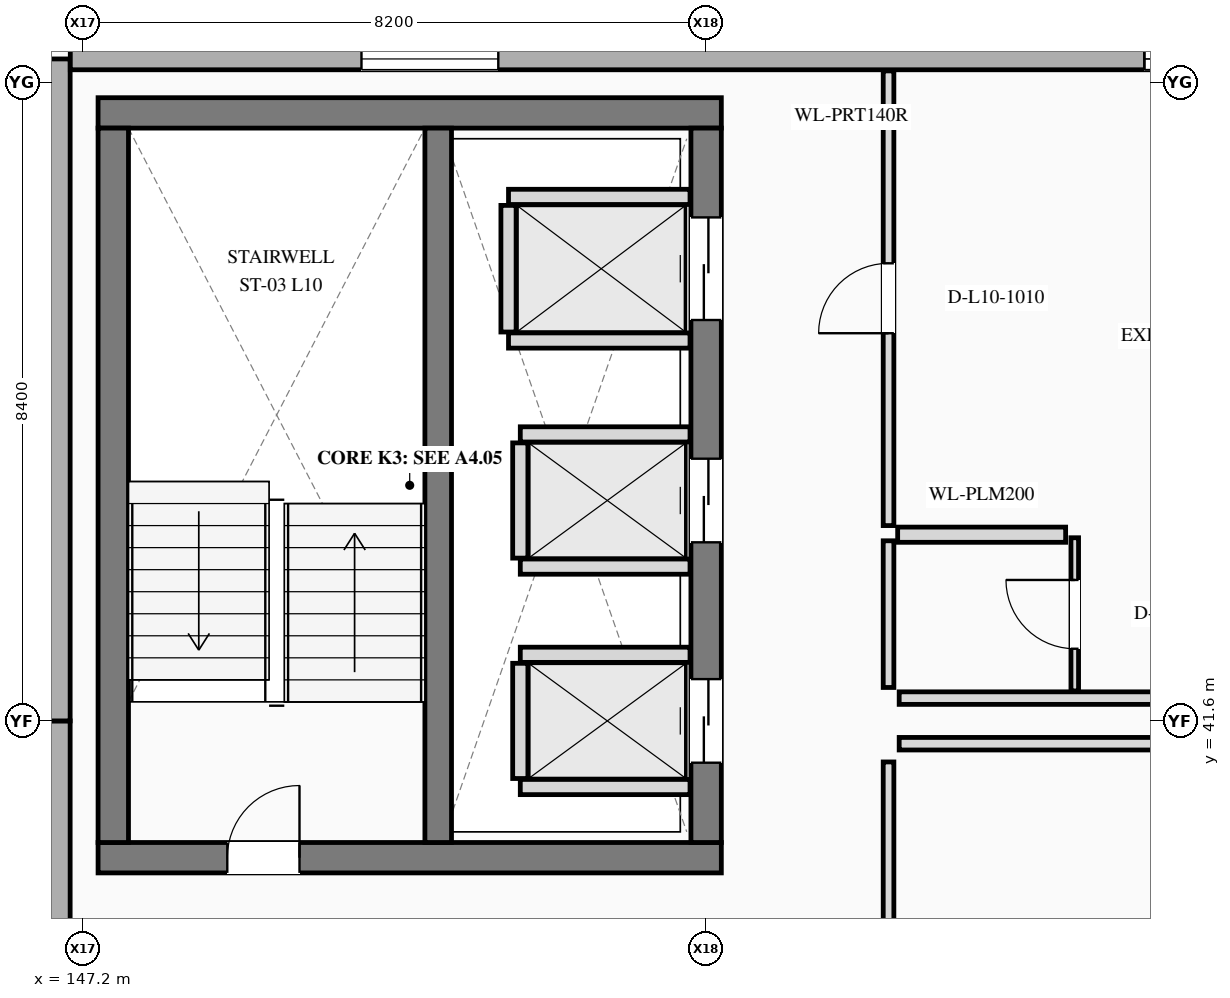
"""IFC4 building model, lengths in metres.
Left out: names, types, materials, properties, quantities, classifications, styles, units other than length and angle.
Written with IfcOpenShell. Run it as: python <this file> out.ifc"""

import sys

from ifc_helpers import new_model, si_unit, direction, frame, frame_2d, origin, place, context, subcontext, project, spatial, rectangle, extrude, element, fill, save


model = new_model("IFC4")
c1 = context("Model", 3, precision=1e-05, world=origin(), true_north=direction((0.0, 1.0)))
c2 = subcontext(c1, "Body", "Model", "MODEL_VIEW")
j1 = project(units=[si_unit("LENGTHUNIT", "METRE"), si_unit("PLANEANGLEUNIT", "RADIAN")], contexts=[c1])
p1 = place(None, origin())
s1 = spatial("IfcSite", under=j1, at=p1, CompositionType="ELEMENT")
p2 = place(p1, origin())
s2 = spatial("IfcBuilding", under=s1, at=p2, CompositionType="ELEMENT")
p3 = place(p2, frame((0.0, 0.0, 41.1)))
s3 = spatial("IfcBuildingStorey", under=s2, at=p3, CompositionType="ELEMENT", Elevation=41.1)
p4 = place(p3, frame((146.89, 33.2, 0.0), z_axis=(0.0, 0.0, 1.0), x_axis=(0.0, 1.0, 0.0)))
e1 = element("IfcWall", 1, at=p4, inside=s3, PredefinedType="STANDARD", context=c2, shape_type="SweptSolid", body=[
    extrude(rectangle(XDim=8.4, YDim=0.285, at=frame_2d((4.2, 0.0))), origin(), (0.0, 0.0, 1.0), 3.5),
])
p5 = place(p3, frame((146.89, 41.6, 0.0), z_axis=(0.0, 0.0, 1.0), x_axis=(0.0, 1.0, 0.0)))
e2 = element("IfcWall", 2, at=p5, inside=s3, PredefinedType="STANDARD", context=c2, shape_type="SweptSolid", body=[
    extrude(rectangle(XDim=8.71, YDim=0.285, at=frame_2d((4.355, 0.0))), origin(), (0.0, 0.0, 1.0), 3.5),
])
p6 = place(p3, frame((166.166, 50.31, 0.0), z_axis=(0.0, 0.0, 1.0), x_axis=(-1.0, 0.0, 0.0)))
e3 = element("IfcWall", 3, at=p6, inside=s3, PredefinedType="STANDARD", context=c2, shape_type="SweptSolid", body=[
    extrude(rectangle(XDim=19.131, YDim=0.285, at=frame_2d((9.565, 0.0))), origin(), (0.0, 0.0, 1.0), 3.5),
])
p7 = place(p6, frame((3.2, 0.0, 0.88)))
e4 = element("IfcOpeningElement", 4, at=p7, cuts=e3, PredefinedType="OPENING", context=c2, shape_type="SweptSolid", body=[
    extrude(rectangle(XDim=1.8, YDim=1.8, at=frame_2d((0.9, 0.9))), frame((0.0, 0.152, 0.0), z_axis=(0.0, -1.0, 0.0), x_axis=(1.0, 0.0, 0.0)), (0.0, 0.0, 1.0), 0.305),
])
p8 = place(p6, frame((13.5, 0.0, 0.88)))
e5 = element("IfcOpeningElement", 5, at=p8, cuts=e3, PredefinedType="OPENING", context=c2, shape_type="SweptSolid", body=[
    extrude(rectangle(XDim=1.8, YDim=1.8, at=frame_2d((0.9, 0.9))), frame((0.0, 0.152, 0.0), z_axis=(0.0, -1.0, 0.0), x_axis=(1.0, 0.0, 0.0)), (0.0, 0.0, 1.0), 0.305),
])
p9 = place(p3, frame((147.4, 39.8, 0.0), z_axis=(0.0, 0.0, 1.0), x_axis=(1.0, 0.0, 0.0)))
e6 = element("IfcWall", 6, at=p9, inside=s3, PredefinedType="SHEAR", context=c2, shape_type="SweptSolid", body=[
    extrude(rectangle(XDim=8.2, YDim=0.4, at=frame_2d((4.1, 0.0))), origin(), (0.0, 0.0, 1.0), 3.5),
])
p10 = place(p9, frame((1.7, 0.0, 0.0)))
e7 = element("IfcOpeningElement", 7, at=p10, cuts=e6, PredefinedType="OPENING", context=c2, shape_type="SweptSolid", body=[
    extrude(rectangle(XDim=0.95, YDim=2.2, at=frame_2d((0.475, 1.1))), frame((0.0, 0.21, 0.0), z_axis=(0.0, -1.0, 0.0), x_axis=(1.0, 0.0, 0.0)), (0.0, 0.0, 1.0), 0.42),
])
p11 = place(p3, frame((155.6, 49.6, 0.0), z_axis=(0.0, 0.0, 1.0), x_axis=(-1.0, 0.0, 0.0)))
e8 = element("IfcWall", 8, at=p11, inside=s3, PredefinedType="SHEAR", context=c2, shape_type="SweptSolid", body=[
    extrude(rectangle(XDim=8.2, YDim=0.4, at=frame_2d((4.1, 0.0))), origin(), (0.0, 0.0, 1.0), 3.5),
])
p12 = place(p3, frame((147.6, 49.4, 0.0), z_axis=(0.0, 0.0, 1.0), x_axis=(0.0, -1.0, 0.0)))
e9 = element("IfcWall", 9, at=p12, inside=s3, PredefinedType="SHEAR", context=c2, shape_type="SweptSolid", body=[
    extrude(rectangle(XDim=9.4, YDim=0.4, at=frame_2d((4.7, 0.0))), origin(), (0.0, 0.0, 1.0), 3.5),
])
p13 = place(p3, frame((155.4, 40.0, 0.0), z_axis=(0.0, 0.0, 1.0), x_axis=(0.0, 1.0, 0.0)))
e10 = element("IfcWall", 10, at=p13, inside=s3, PredefinedType="SHEAR", context=c2, shape_type="SweptSolid", body=[
    extrude(rectangle(XDim=9.4, YDim=0.4, at=frame_2d((4.7, 0.0))), origin(), (0.0, 0.0, 1.0), 3.5),
])
p14 = place(p13, frame((1.05, 0.0, 0.0)))
e11 = element("IfcOpeningElement", 11, at=p14, cuts=e10, PredefinedType="OPENING", context=c2, shape_type="SweptSolid", body=[
    extrude(rectangle(XDim=1.1, YDim=2.2, at=frame_2d((0.55, 1.1))), frame((0.0, 0.21, 0.0), z_axis=(0.0, -1.0, 0.0), x_axis=(1.0, 0.0, 0.0)), (0.0, 0.0, 1.0), 0.42),
])
p15 = place(p13, frame((3.95, 0.0, 0.0)))
e12 = element("IfcOpeningElement", 12, at=p15, cuts=e10, PredefinedType="OPENING", context=c2, shape_type="SweptSolid", body=[
    extrude(rectangle(XDim=1.1, YDim=2.2, at=frame_2d((0.55, 1.1))), frame((0.0, 0.21, 0.0), z_axis=(0.0, -1.0, 0.0), x_axis=(1.0, 0.0, 0.0)), (0.0, 0.0, 1.0), 0.42),
])
p16 = place(p13, frame((6.875, 0.0, 0.0)))
e13 = element("IfcOpeningElement", 13, at=p16, cuts=e10, PredefinedType="OPENING", context=c2, shape_type="SweptSolid", body=[
    extrude(rectangle(XDim=1.35, YDim=2.3, at=frame_2d((0.675, 1.15))), frame((0.0, 0.21, 0.0), z_axis=(0.0, -1.0, 0.0), x_axis=(1.0, 0.0, 0.0)), (0.0, 0.0, 1.0), 0.42),
])
p17 = place(p3, frame((151.875, 40.0, 0.0), z_axis=(0.0, 0.0, 1.0), x_axis=(0.0, 1.0, 0.0)))
e14 = element("IfcWall", 14, at=p17, inside=s3, PredefinedType="SHEAR", context=c2, shape_type="SweptSolid", body=[
    extrude(rectangle(XDim=9.4, YDim=0.35, at=frame_2d((4.7, 0.0))), origin(), (0.0, 0.0, 1.0), 3.5),
])
for number, where, z_axis, x_axis in (
    (15, (152.955, 40.73, 0.0), (0.0, 0.0, 1.0), (1.0, 0.0, 0.0)),
    (16, (152.955, 42.47, 0.0), (0.0, 0.0, 1.0), (1.0, 0.0, 0.0)),
):
    element("IfcWall", number, at=place(p3, frame(where, z_axis=z_axis, x_axis=x_axis)), inside=s3, PredefinedType="PLUMBINGWALL", context=c2, shape_type="SweptSolid", body=[
        extrude(rectangle(XDim=2.233, YDim=0.2, at=frame_2d((1.116, 0.0))), origin(), (0.0, 0.0, 1.0), 3.18),
    ])
p18 = place(p3, frame((152.955, 40.842, 0.0), z_axis=(0.0, 0.0, 1.0), x_axis=(0.0, 1.0, 0.0)))
e17 = element("IfcWall", 17, at=p18, inside=s3, PredefinedType="PLUMBINGWALL", context=c2, shape_type="SweptSolid", body=[
    extrude(rectangle(XDim=1.516, YDim=0.2, at=frame_2d((0.758, 0.0))), origin(), (0.0, 0.0, 1.0), 3.18),
])
for number, where, z_axis, x_axis in (
    (18, (152.955, 43.63, 0.0), (0.0, 0.0, 1.0), (1.0, 0.0, 0.0)),
    (19, (152.955, 45.37, 0.0), (0.0, 0.0, 1.0), (1.0, 0.0, 0.0)),
):
    element("IfcWall", number, at=place(p3, frame(where, z_axis=z_axis, x_axis=x_axis)), inside=s3, PredefinedType="PLUMBINGWALL", context=c2, shape_type="SweptSolid", body=[
        extrude(rectangle(XDim=2.233, YDim=0.2, at=frame_2d((1.116, 0.0))), origin(), (0.0, 0.0, 1.0), 3.18),
    ])
p19 = place(p3, frame((152.955, 43.742, 0.0), z_axis=(0.0, 0.0, 1.0), x_axis=(0.0, 1.0, 0.0)))
e20 = element("IfcWall", 20, at=p19, inside=s3, PredefinedType="PLUMBINGWALL", context=c2, shape_type="SweptSolid", body=[
    extrude(rectangle(XDim=1.516, YDim=0.2, at=frame_2d((0.758, 0.0))), origin(), (0.0, 0.0, 1.0), 3.18),
])
for number, where, z_axis, x_axis in (
    (21, (152.8, 46.605, 0.0), (0.0, 0.0, 1.0), (1.0, 0.0, 0.0)),
    (22, (152.8, 48.495, 0.0), (0.0, 0.0, 1.0), (1.0, 0.0, 0.0)),
):
    element("IfcWall", number, at=place(p3, frame(where, z_axis=z_axis, x_axis=x_axis)), inside=s3, PredefinedType="PLUMBINGWALL", context=c2, shape_type="SweptSolid", body=[
        extrude(rectangle(XDim=2.388, YDim=0.2, at=frame_2d((1.194, 0.0))), origin(), (0.0, 0.0, 1.0), 3.18),
    ])
p20 = place(p3, frame((152.8, 46.717, 0.0), z_axis=(0.0, 0.0, 1.0), x_axis=(0.0, 1.0, 0.0)))
e23 = element("IfcWall", 23, at=p20, inside=s3, PredefinedType="PLUMBINGWALL", context=c2, shape_type="SweptSolid", body=[
    extrude(rectangle(XDim=1.666, YDim=0.2, at=frame_2d((0.833, 0.0))), origin(), (0.0, 0.0, 1.0), 3.18),
])
p21 = place(p3, frame((157.8, 35.77, 0.0), z_axis=(0.0, 0.0, 1.0), x_axis=(0.0, 1.0, 0.0)))
e24 = element("IfcWall", 24, at=p21, inside=s3, PredefinedType="PARTITIONING", context=c2, shape_type="SweptSolid", body=[
    extrude(rectangle(XDim=5.29, YDim=0.14, at=frame_2d((2.645, 0.0))), origin(), (0.0, 0.0, 1.0), 3.18),
])
p22 = place(p21, frame((2.125, 0.0, 0.0)))
e25 = element("IfcOpeningElement", 25, at=p22, cuts=e24, PredefinedType="OPENING", context=c2, shape_type="SweptSolid", body=[
    extrude(rectangle(XDim=1.04, YDim=2.4, at=frame_2d((0.52, 1.2))), frame((0.0, 0.08, 0.0), z_axis=(0.0, -1.0, 0.0), x_axis=(1.0, 0.0, 0.0)), (0.0, 0.0, 1.0), 0.16),
])
p23 = place(p3, frame((157.94, 41.3, 0.0), z_axis=(0.0, 0.0, 1.0), x_axis=(1.0, 0.0, 0.0)))
e26 = element("IfcWall", 26, at=p23, inside=s3, PredefinedType="PARTITIONING", context=c2, shape_type="SweptSolid", body=[
    extrude(rectangle(XDim=8.213, YDim=0.165, at=frame_2d((4.106, 0.0))), origin(), (0.0, 0.0, 1.0), 2.57),
])
p24 = place(p3, frame((157.8, 42.04, 0.0), z_axis=(0.0, 0.0, 1.0), x_axis=(0.0, 1.0, 0.0)))
e27 = element("IfcWall", 27, at=p24, inside=s3, PredefinedType="PARTITIONING", context=c2, shape_type="SweptSolid", body=[
    extrude(rectangle(XDim=1.93, YDim=0.14, at=frame_2d((0.965, 0.0))), origin(), (0.0, 0.0, 1.0), 3.18),
])
p25 = place(p3, frame((157.8, 44.17, 0.0), z_axis=(0.0, 0.0, 1.0), x_axis=(0.0, 1.0, 0.0)))
e28 = element("IfcWall", 28, at=p25, inside=s3, PredefinedType="PARTITIONING", context=c2, shape_type="SweptSolid", body=[
    extrude(rectangle(XDim=5.983, YDim=0.14, at=frame_2d((2.991, 0.0))), origin(), (0.0, 0.0, 1.0), 3.18),
])
p26 = place(p25, frame((2.531, 0.0, 0.0)))
e29 = element("IfcOpeningElement", 29, at=p26, cuts=e28, PredefinedType="OPENING", context=c2, shape_type="SweptSolid", body=[
    extrude(rectangle(XDim=0.92, YDim=2.15, at=frame_2d((0.46, 1.075))), frame((0.0, 0.08, 0.0), z_axis=(0.0, -1.0, 0.0), x_axis=(1.0, 0.0, 0.0)), (0.0, 0.0, 1.0), 0.16),
])
p27 = place(p3, frame((157.94, 41.9, 0.0), z_axis=(0.0, 0.0, 1.0), x_axis=(1.0, 0.0, 0.0)))
e30 = element("IfcWall", 30, at=p27, inside=s3, PredefinedType="PARTITIONING", context=c2, shape_type="SweptSolid", body=[
    extrude(rectangle(XDim=8.213, YDim=0.165, at=frame_2d((4.106, 0.0))), origin(), (0.0, 0.0, 1.0), 2.57),
])
p28 = place(p3, frame((157.92, 44.05, 0.0), z_axis=(0.0, 0.0, 1.0), x_axis=(1.0, 0.0, 0.0)))
e31 = element("IfcWall", 31, at=p28, inside=s3, PredefinedType="PLUMBINGWALL", context=c2, shape_type="SweptSolid", body=[
    extrude(rectangle(XDim=2.21, YDim=0.2, at=frame_2d((1.105, 0.0))), origin(), (0.0, 0.0, 1.0), 3.18),
])
p29 = place(p3, frame((160.25, 41.994, 0.0), z_axis=(0.0, 0.0, 1.0), x_axis=(0.0, 1.0, 0.0)))
e32 = element("IfcWall", 32, at=p29, inside=s3, PredefinedType="PARTITIONING", context=c2, shape_type="SweptSolid", body=[
    extrude(rectangle(XDim=2.016, YDim=0.1, at=frame_2d((1.008, 0.0))), origin(), (0.0, 0.0, 1.0), 3.18),
])
p30 = place(p29, frame((0.555, 0.0, 0.0)))
e33 = element("IfcOpeningElement", 33, at=p30, cuts=e32, PredefinedType="OPENING", context=c2, shape_type="SweptSolid", body=[
    extrude(rectangle(XDim=0.905, YDim=2.1, at=frame_2d((0.453, 1.05))), frame((0.0, 0.06, 0.0), z_axis=(0.0, -1.0, 0.0), x_axis=(1.0, 0.0, 0.0)), (0.0, 0.0, 1.0), 0.12),
])
p31 = place(p7, origin())
e34 = element("IfcWindow", 34, at=p31, inside=s3, PartitioningType="SINGLE_PANEL", PredefinedType="WINDOW", context=c2, shape_type="SweptSolid", body=[
    extrude(rectangle(XDim=1.8, YDim=1.8, at=frame_2d((0.9, 0.9))), frame((0.0, 0.03, 0.0), z_axis=(0.0, -1.0, 0.0), x_axis=(1.0, 0.0, 0.0)), (0.0, 0.0, 1.0), 0.06),
])
fill(e4, e34)
p32 = place(p8, origin())
e35 = element("IfcWindow", 35, at=p32, inside=s3, PartitioningType="SINGLE_PANEL", PredefinedType="WINDOW", context=c2, shape_type="SweptSolid", body=[
    extrude(rectangle(XDim=1.8, YDim=1.8, at=frame_2d((0.9, 0.9))), frame((0.0, 0.03, 0.0), z_axis=(0.0, -1.0, 0.0), x_axis=(1.0, 0.0, 0.0)), (0.0, 0.0, 1.0), 0.06),
])
fill(e5, e35)
p33 = place(p10, origin())
e36 = element("IfcDoor", 36, at=p33, inside=s3, OperationType="SINGLE_SWING_RIGHT", PredefinedType="DOOR", context=c2, shape_type="SweptSolid", body=[
    extrude(rectangle(XDim=0.95, YDim=2.2, at=frame_2d((0.475, 1.1))), frame((0.0, 0.025, 0.0), z_axis=(0.0, -1.0, 0.0), x_axis=(1.0, 0.0, 0.0)), (0.0, 0.0, 1.0), 0.05),
])
fill(e7, e36)
p34 = place(p14, origin())
e37 = element("IfcDoor", 37, at=p34, inside=s3, OperationType="SLIDING_TO_LEFT", PredefinedType="DOOR", context=c2, shape_type="SweptSolid", body=[
    extrude(rectangle(XDim=1.1, YDim=2.2, at=frame_2d((0.55, 1.1))), frame((0.0, 0.025, 0.0), z_axis=(0.0, -1.0, 0.0), x_axis=(1.0, 0.0, 0.0)), (0.0, 0.0, 1.0), 0.05),
])
fill(e11, e37)
p35 = place(p15, origin())
e38 = element("IfcDoor", 38, at=p35, inside=s3, OperationType="SLIDING_TO_RIGHT", PredefinedType="DOOR", context=c2, shape_type="SweptSolid", body=[
    extrude(rectangle(XDim=1.1, YDim=2.2, at=frame_2d((0.55, 1.1))), frame((0.0, 0.025, 0.0), z_axis=(0.0, -1.0, 0.0), x_axis=(1.0, 0.0, 0.0)), (0.0, 0.0, 1.0), 0.05),
])
fill(e12, e38)
p36 = place(p16, origin())
e39 = element("IfcDoor", 39, at=p36, inside=s3, OperationType="SLIDING_TO_LEFT", PredefinedType="DOOR", context=c2, shape_type="SweptSolid", body=[
    extrude(rectangle(XDim=1.35, YDim=2.3, at=frame_2d((0.675, 1.15))), frame((0.0, 0.025, 0.0), z_axis=(0.0, -1.0, 0.0), x_axis=(1.0, 0.0, 0.0)), (0.0, 0.0, 1.0), 0.05),
])
fill(e13, e39)
p37 = place(p26, origin())
e40 = element("IfcDoor", 40, at=p37, inside=s3, OperationType="SINGLE_SWING_LEFT", PredefinedType="DOOR", context=c2, shape_type="SweptSolid", body=[
    extrude(rectangle(XDim=0.92, YDim=2.15, at=frame_2d((0.46, 1.075))), frame((0.0, 0.025, 0.0), z_axis=(0.0, -1.0, 0.0), x_axis=(1.0, 0.0, 0.0)), (0.0, 0.0, 1.0), 0.05),
])
fill(e29, e40)
p38 = place(p30, origin())
e41 = element("IfcDoor", 41, at=p38, inside=s3, OperationType="SINGLE_SWING_RIGHT", PredefinedType="DOOR", context=c2, shape_type="SweptSolid", body=[
    extrude(rectangle(XDim=0.905, YDim=2.1, at=frame_2d((0.453, 1.05))), frame((0.0, 0.025, 0.0), z_axis=(0.0, -1.0, 0.0), x_axis=(1.0, 0.0, 0.0)), (0.0, 0.0, 1.0), 0.05),
])
fill(e33, e41)
save(model, sys.argv[1])
